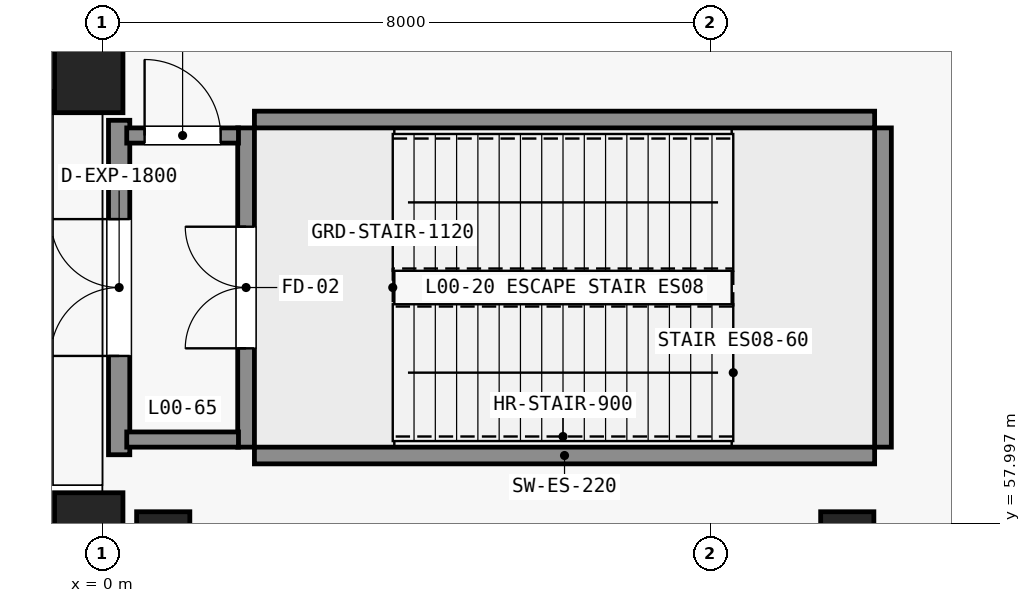
"""IFC4 building model, lengths in metres.
Left out: names, types, materials, properties, quantities, classifications, styles, units other than length and angle.
Written with IfcOpenShell. Run it as: python <this file> out.ifc"""

import sys

from ifc_helpers import new_model, si_unit, direction, frame, frame_2d, origin, origin_2d, place, context, subcontext, project, spatial, rectangle, extrude, element, fill, save


model = new_model("IFC4")
c1 = context("Model", 3, precision=1e-05, world=origin(), true_north=direction((0.0, 1.0)))
c2 = subcontext(c1, "Body", "Model", "MODEL_VIEW")
j1 = project(units=[si_unit("LENGTHUNIT", "METRE"), si_unit("PLANEANGLEUNIT", "RADIAN")], contexts=[c1])
p1 = place(None, origin())
s1 = spatial("IfcSite", under=j1, at=p1, CompositionType="ELEMENT")
p2 = place(p1, origin())
s2 = spatial("IfcBuilding", under=s1, at=p2, CompositionType="ELEMENT")
p3 = place(p2, origin())
s3 = spatial("IfcBuildingStorey", under=s2, at=p3, CompositionType="ELEMENT", Elevation=0.0)
for number, where, z_axis, x_axis in (
    (1, (-0.18, 57.8, -0.45), (0.0, 0.0, 1.0), (1.0, 0.0, 0.0)),
    (2, (-0.18, 64.0, -0.45), (0.0, 0.0, 1.0), (1.0, 0.0, 0.0)),
):
    element("IfcColumn", number, at=place(p3, frame(where, z_axis=z_axis, x_axis=x_axis)), inside=s3, PredefinedType="PILASTER", context=c2, shape_type="SweptSolid", body=[
        extrude(rectangle(XDim=0.9, YDim=1.2, at=origin_2d()), origin(), (0.0, 0.0, 1.0), 6.45),
    ])
for number, where, z_axis, x_axis in (
    (3, (0.8, 57.8, -0.45), (0.0, 0.0, 1.0), (1.0, 0.0, 0.0)),
    (4, (9.8, 57.8, -0.45), (0.0, 0.0, 1.0), (1.0, 0.0, 0.0)),
):
    element("IfcColumn", number, at=place(p3, frame(where, z_axis=z_axis, x_axis=x_axis)), inside=s3, PredefinedType="COLUMN", context=c2, shape_type="SweptSolid", body=[
        extrude(rectangle(XDim=0.7, YDim=0.7, at=origin_2d()), origin(), (0.0, 0.0, 1.0), 6.45),
    ])
for number, where, z_axis, x_axis in (
    (5, (2.0, 58.89, -0.45), (0.0, 0.0, 1.0), (1.0, 0.0, 0.0)),
    (6, (2.0, 63.31, -0.45), (0.0, 0.0, 1.0), (1.0, 0.0, 0.0)),
):
    element("IfcWall", number, at=place(p3, frame(where, z_axis=z_axis, x_axis=x_axis)), inside=s3, PredefinedType="SHEAR", context=c2, shape_type="SweptSolid", body=[
        extrude(rectangle(XDim=8.16, YDim=0.22, at=frame_2d((4.08, 0.0))), origin(), (0.0, 0.0, 1.0), 6.45),
    ])
p4 = place(p3, frame((1.89, 59.0, -0.45), z_axis=(0.0, 0.0, 1.0), x_axis=(0.0, 1.0, 0.0)))
e7 = element("IfcWall", 7, at=p4, inside=s3, PredefinedType="SHEAR", context=c2, shape_type="SweptSolid", body=[
    extrude(rectangle(XDim=4.2, YDim=0.22, at=frame_2d((2.1, 0.0))), origin(), (0.0, 0.0, 1.0), 6.45),
])
p5 = place(p4, frame((1.3, 0.0, 0.45)))
e8 = element("IfcOpeningElement", 8, at=p5, cuts=e7, PredefinedType="OPENING", context=c2, shape_type="SweptSolid", body=[
    extrude(rectangle(XDim=1.6, YDim=2.2, at=frame_2d((0.8, 1.1))), frame((0.0, 0.12, 0.0), z_axis=(0.0, -1.0, 0.0), x_axis=(1.0, 0.0, 0.0)), (0.0, 0.0, 1.0), 0.24),
])
p6 = place(p3, frame((10.27, 59.0, -0.45), z_axis=(0.0, 0.0, 1.0), x_axis=(0.0, 1.0, 0.0)))
e9 = element("IfcWall", 9, at=p6, inside=s3, PredefinedType="SHEAR", context=c2, shape_type="SweptSolid", body=[
    extrude(rectangle(XDim=4.2, YDim=0.22, at=frame_2d((2.1, 0.0))), origin(), (0.0, 0.0, 1.0), 6.45),
])
p7 = place(p3, frame((0.22, 58.9, 0.0), z_axis=(0.0, 0.0, 1.0), x_axis=(0.0, 1.0, 0.0)))
e10 = element("IfcWall", 10, at=p7, inside=s3, PredefinedType="STANDARD", context=c2, shape_type="SweptSolid", body=[
    extrude(rectangle(XDim=4.4, YDim=0.28, at=frame_2d((2.2, 0.0))), origin(), (0.0, 0.0, 1.0), 5.64),
])
p8 = place(p7, frame((1.3, 0.0, 0.0)))
e11 = element("IfcOpeningElement", 11, at=p8, cuts=e10, PredefinedType="OPENING", context=c2, shape_type="SweptSolid", body=[
    extrude(rectangle(XDim=1.8, YDim=2.25, at=frame_2d((0.9, 1.125))), frame((0.0, 0.15, 0.0), z_axis=(0.0, -1.0, 0.0), x_axis=(1.0, 0.0, 0.0)), (0.0, 0.0, 1.0), 0.3),
])
p9 = place(p3, frame((0.32, 59.1, 0.0), z_axis=(0.0, 0.0, 1.0), x_axis=(1.0, 0.0, 0.0)))
e12 = element("IfcWall", 12, at=p9, inside=s3, PredefinedType="STANDARD", context=c2, shape_type="SweptSolid", body=[
    extrude(rectangle(XDim=1.47, YDim=0.2, at=frame_2d((0.735, 0.0))), origin(), (0.0, 0.0, 1.0), 4.89),
])
p10 = place(p3, frame((0.32, 63.1, 0.0), z_axis=(0.0, 0.0, 1.0), x_axis=(1.0, 0.0, 0.0)))
e13 = element("IfcWall", 13, at=p10, inside=s3, PredefinedType="STANDARD", context=c2, shape_type="SweptSolid", body=[
    extrude(rectangle(XDim=1.47, YDim=0.2, at=frame_2d((0.735, 0.0))), origin(), (0.0, 0.0, 1.0), 4.89),
])
p11 = place(p10, frame((0.235, 0.0, 0.0)))
e14 = element("IfcOpeningElement", 14, at=p11, cuts=e13, PredefinedType="OPENING", context=c2, shape_type="SweptSolid", body=[
    extrude(rectangle(XDim=1.0, YDim=2.15, at=frame_2d((0.5, 1.075))), frame((0.0, 0.11, 0.0), z_axis=(0.0, -1.0, 0.0), x_axis=(1.0, 0.0, 0.0)), (0.0, 0.0, 1.0), 0.22),
])
p12 = place(p5, origin())
e15 = element("IfcDoor", 15, at=p12, inside=s3, OperationType="DOUBLE_DOOR_SINGLE_SWING", PredefinedType="DOOR", context=c2, shape_type="SweptSolid", body=[
    extrude(rectangle(XDim=1.6, YDim=2.2, at=frame_2d((0.8, 1.1))), frame((0.0, 0.025, 0.0), z_axis=(0.0, -1.0, 0.0), x_axis=(1.0, 0.0, 0.0)), (0.0, 0.0, 1.0), 0.05),
])
fill(e8, e15)
p13 = place(p8, origin())
e16 = element("IfcDoor", 16, at=p13, inside=s3, OperationType="DOUBLE_DOOR_SINGLE_SWING", PredefinedType="DOOR", context=c2, shape_type="SweptSolid", body=[
    extrude(rectangle(XDim=1.8, YDim=2.25, at=frame_2d((0.9, 1.125))), frame((0.0, 0.025, 0.0), z_axis=(0.0, -1.0, 0.0), x_axis=(1.0, 0.0, 0.0)), (0.0, 0.0, 1.0), 0.05),
])
fill(e11, e16)
p14 = place(p11, origin())
e17 = element("IfcDoor", 17, at=p14, inside=s3, OperationType="SINGLE_SWING_LEFT", PredefinedType="DOOR", context=c2, shape_type="SweptSolid", body=[
    extrude(rectangle(XDim=1.0, YDim=2.15, at=frame_2d((0.5, 1.075))), frame((0.0, 0.025, 0.0), z_axis=(0.0, -1.0, 0.0), x_axis=(1.0, 0.0, 0.0)), (0.0, 0.0, 1.0), 0.05),
])
fill(e14, e17)
save(model, sys.argv[1])
